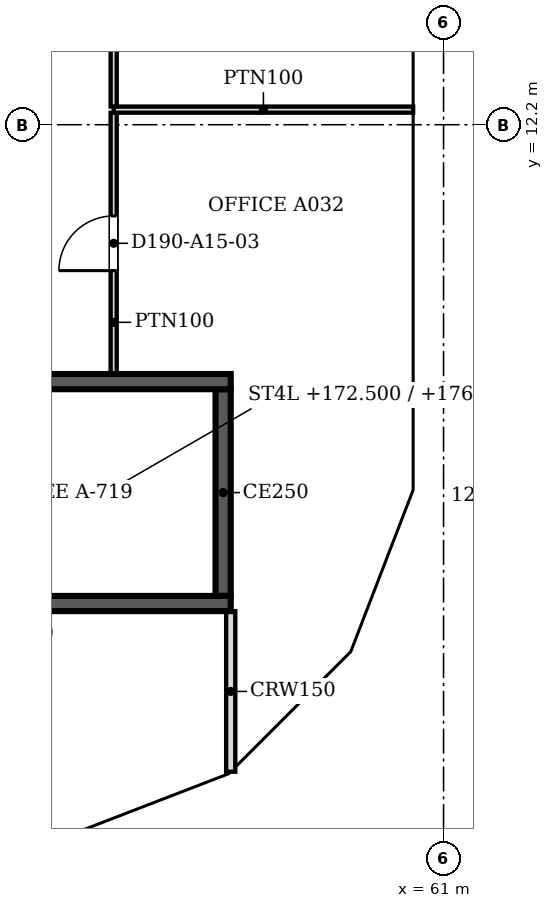
"""IFC4 building model, lengths in metres.
Left out: names, types, materials, properties, quantities, classifications, styles, units other than length and angle.
Written with IfcOpenShell. Run it as: python <this file> out.ifc"""

import sys

from ifc_helpers import new_model, si_unit, direction, frame, frame_2d, origin, place, context, subcontext, project, spatial, polyline, rectangle, outline, extrude, faceted_brep, source, transform, mapped, element, fill, save


model = new_model("IFC4")
c1 = context("Model", 3, precision=1e-05, world=origin(), true_north=direction((0.0, 1.0)))
c2 = subcontext(c1, "Body", "Model", "MODEL_VIEW")
j1 = project(units=[si_unit("LENGTHUNIT", "METRE"), si_unit("PLANEANGLEUNIT", "RADIAN")], contexts=[c1])
p1 = place(None, origin())
s1 = spatial("IfcSite", under=j1, at=p1, CompositionType="ELEMENT")
p2 = place(p1, origin())
s2 = spatial("IfcBuilding", under=s1, at=p2, CompositionType="ELEMENT")
p3 = place(p2, frame((0.0, 0.0, 170.6)))
s3 = spatial("IfcBuildingStorey", under=s2, at=p3, CompositionType="ELEMENT", Elevation=170.6)
m1 = source(origin(), c2, "Body", "Brep", [
    faceted_brep([(0.047, -0.25, 0.0), (2.997, -0.25, 3.8), (0.047, -0.25, 7.6), (0.0, -0.25, 7.541), (0.0, -0.25, 0.059), (0.093, 0.25, 7.54), (2.944, 0.25, 3.868), (2.944, 0.25, 3.732), (0.093, 0.25, 0.06), (2.997, 0.0, 3.8), (0.047, 0.0, 0.0), (0.047, 0.0, 7.6)], [[[0, 1, 2, 3, 4]], [[5, 6, 7, 8]], [[8, 7, 9, 1, 0, 10]], [[6, 5, 11, 2, 1, 9]], [[3, 2, 11]], [[10, 0, 4]], [[8, 10, 4, 3, 11, 5]], [[7, 6, 9]]]),
])
p4 = place(p3, frame((54.81, 0.233, -3.8), z_axis=(0.0, 0.0, 1.0), x_axis=(0.932990326376, 0.359901446078, 0.0)))
e1 = element("IfcWall", 1, at=p4, inside=s3, PredefinedType="SOLIDWALL", context=c2, shape_type="MappedRepresentation", body=[
    mapped(m1, transform((0.0, 0.0, 0.0), scale=1.0)),
])
m2 = source(origin(), c2, "Body", "SweptSolid", [
    extrude(outline(polyline([(0.247, 0.665), (2.681, 3.8), (0.247, 6.935), (0.247, 0.665)])), frame((0.0, 0.26, 0.0), z_axis=(0.0, -1.0, 0.0), x_axis=(1.0, 0.0, 0.0)), (0.0, 0.0, 1.0), 0.52),
])
p5 = place(p4, origin())
e2 = element("IfcOpeningElement", 2, at=p5, cuts=e1, PredefinedType="OPENING", context=c2, shape_type="MappedRepresentation", body=[
    mapped(m2, transform((0.0, 0.0, 0.0), scale=1.0)),
])
m3 = source(origin(), c2, "Body", "Brep", [
    faceted_brep([(2.944, -0.25, 0.0), (2.997, -0.25, 0.068), (2.997, -0.25, 7.532), (2.944, -0.25, 7.6), (0.0, -0.25, 3.8), (0.053, 0.25, 3.868), (2.891, 0.25, 7.532), (2.891, 0.25, 0.068), (0.053, 0.25, 3.732), (2.944, 0.0, 0.0), (2.944, 0.0, 7.6), (0.0, 0.0, 3.8)], [[[0, 1, 2, 3, 4]], [[5, 6, 7, 8]], [[1, 0, 9]], [[10, 3, 2]], [[6, 5, 11, 4, 3, 10]], [[8, 7, 9, 0, 4, 11]], [[8, 11, 5]], [[1, 9, 7, 6, 10, 2]]]),
])
p6 = place(p3, frame((57.606, 1.312, -3.8), z_axis=(0.0, 0.0, 1.0), x_axis=(0.707147509625, 0.707066050402, 0.0)))
e3 = element("IfcWall", 3, at=p6, inside=s3, PredefinedType="SOLIDWALL", context=c2, shape_type="MappedRepresentation", body=[
    mapped(m3, transform((0.0, 0.0, 0.0), scale=1.0)),
])
m4 = source(origin(), c2, "Body", "SweptSolid", [
    extrude(outline(polyline([(2.744, 6.934), (0.316, 3.8), (2.744, 0.666), (2.744, 6.934)])), frame((0.0, 0.26, 0.0), z_axis=(0.0, -1.0, 0.0), x_axis=(1.0, 0.0, 0.0)), (0.0, 0.0, 1.0), 0.52),
])
p7 = place(p6, origin())
e4 = element("IfcOpeningElement", 4, at=p7, cuts=e3, PredefinedType="OPENING", context=c2, shape_type="MappedRepresentation", body=[
    mapped(m4, transform((0.0, 0.0, 0.0), scale=1.0)),
])
m5 = source(origin(), c2, "Body", "Brep", [
    faceted_brep([(0.053, -0.25, 0.0), (3.003, -0.25, 3.8), (0.053, -0.25, 7.6), (0.0, -0.25, 7.531), (0.0, -0.25, 0.068), (0.106, 0.25, 7.532), (2.957, 0.25, 3.86), (2.957, 0.25, 3.74), (0.106, 0.25, 0.068), (3.003, 0.0, 3.8), (0.053, 0.0, 0.0), (0.053, 0.0, 7.6)], [[[0, 1, 2, 3, 4]], [[5, 6, 7, 8]], [[8, 7, 9, 1, 0, 10]], [[6, 5, 11, 2, 1, 9]], [[3, 2, 11]], [[10, 0, 4]], [[8, 10, 4, 3, 11, 5]], [[7, 6, 9]]]),
])
p8 = place(p3, frame((59.669, 3.344, -3.8), z_axis=(0.0, 0.0, 1.0), x_axis=(0.35992665181, 0.932980602862, 0.0)))
e5 = element("IfcWall", 5, at=p8, inside=s3, PredefinedType="SOLIDWALL", context=c2, shape_type="MappedRepresentation", body=[
    mapped(m5, transform((0.0, 0.0, 0.0), scale=1.0)),
])
m6 = source(origin(), c2, "Body", "SweptSolid", [
    extrude(outline(polyline([(0.253, 0.665), (2.687, 3.8), (0.253, 6.935), (0.253, 0.665)])), frame((0.0, 0.26, 0.0), z_axis=(0.0, -1.0, 0.0), x_axis=(1.0, 0.0, 0.0)), (0.0, 0.0, 1.0), 0.52),
])
p9 = place(p8, origin())
e6 = element("IfcOpeningElement", 6, at=p9, cuts=e5, PredefinedType="OPENING", context=c2, shape_type="MappedRepresentation", body=[
    mapped(m6, transform((0.0, 0.0, 0.0), scale=1.0)),
])
m7 = source(origin(), c2, "Body", "Brep", [
    faceted_brep([(3.003, -0.25, 0.0), (6.053, -0.25, 3.8), (3.003, -0.25, 7.6), (0.0, -0.25, 3.8), (0.047, 0.25, 3.859), (3.003, 0.25, 7.6), (6.053, 0.25, 3.8), (3.003, 0.25, 0.0), (0.047, 0.25, 3.741), (0.0, 0.0, 3.8)], [[[0, 1, 2, 3]], [[4, 5, 6, 7, 8]], [[7, 6, 1, 0]], [[6, 5, 2, 1]], [[5, 4, 9, 3, 2]], [[8, 7, 0, 3, 9]], [[8, 9, 4]]]),
])
p10 = place(p3, frame((60.75, 6.146, -3.8), z_axis=(0.0, 0.0, 1.0), x_axis=(0.0, 1.0, 0.0)))
e7 = element("IfcWall", 7, at=p10, inside=s3, PredefinedType="SOLIDWALL", context=c2, shape_type="MappedRepresentation", body=[
    mapped(m7, transform((0.0, 0.0, 0.0), scale=1.0)),
])
m8 = source(origin(), c2, "Body", "SweptSolid", [
    extrude(outline(polyline([(3.005, 0.401), (5.733, 3.8), (3.005, 7.199), (0.319, 3.8), (3.005, 0.401)])), frame((0.0, 0.26, 0.0), z_axis=(0.0, -1.0, 0.0), x_axis=(1.0, 0.0, 0.0)), (0.0, 0.0, 1.0), 0.52),
])
p11 = place(p10, origin())
e8 = element("IfcOpeningElement", 8, at=p11, cuts=e7, PredefinedType="OPENING", context=c2, shape_type="MappedRepresentation", body=[
    mapped(m8, transform((0.0, 0.0, 0.0), scale=1.0)),
])
m9 = source(origin(), c2, "Body", "SweptSolid", [
    extrude(outline(polyline([(3.05, 0.0), (6.1, 3.8), (3.05, 7.6), (0.0, 3.8), (3.05, 0.0)])), frame((0.0, 0.25, 0.0), z_axis=(0.0, -1.0, 0.0), x_axis=(1.0, 0.0, 0.0)), (0.0, 0.0, 1.0), 0.5),
])
p12 = place(p3, frame((60.75, 12.2, -3.8), z_axis=(0.0, 0.0, 1.0), x_axis=(0.0, 1.0, 0.0)))
e9 = element("IfcWall", 9, at=p12, inside=s3, PredefinedType="SOLIDWALL", context=c2, shape_type="MappedRepresentation", body=[
    mapped(m9, transform((0.0, 0.0, 0.0), scale=1.0)),
])
m10 = source(origin(), c2, "Body", "SweptSolid", [
    extrude(outline(polyline([(3.05, 0.399), (5.78, 3.8), (3.05, 7.2), (0.321, 3.8), (3.05, 0.399)])), frame((0.0, 0.26, 0.0), z_axis=(0.0, -1.0, 0.0), x_axis=(1.0, 0.0, 0.0)), (0.0, 0.0, 1.0), 0.52),
])
p13 = place(p12, origin())
e10 = element("IfcOpeningElement", 10, at=p13, cuts=e9, PredefinedType="OPENING", context=c2, shape_type="MappedRepresentation", body=[
    mapped(m10, transform((0.0, 0.0, 0.0), scale=1.0)),
])
p14 = place(p2, frame((0.0, 0.0, 174.4)))
s4 = spatial("IfcBuildingStorey", under=s2, at=p14, CompositionType="ELEMENT", Elevation=174.4)
m11 = source(origin(), c2, "Body", "Brep", [
    faceted_brep([(2.95, -0.25, 0.0), (3.003, -0.25, 0.068), (3.003, -0.25, 7.531), (2.95, -0.25, 7.6), (0.0, -0.25, 3.8), (0.047, 0.25, 3.86), (2.898, 0.25, 7.532), (2.898, 0.25, 0.068), (0.047, 0.25, 3.74), (2.95, 0.0, 0.0), (2.95, 0.0, 7.6), (0.0, 0.0, 3.8)], [[[0, 1, 2, 3, 4]], [[5, 6, 7, 8]], [[1, 0, 9]], [[10, 3, 2]], [[6, 5, 11, 4, 3, 10]], [[8, 7, 9, 0, 4, 11]], [[8, 11, 5]], [[1, 9, 7, 6, 10, 2]]]),
])
p15 = place(p14, frame((54.854, 0.25, -3.8), z_axis=(0.0, 0.0, 1.0), x_axis=(0.932970071518, 0.359953949349, 0.0)))
e11 = element("IfcWall", 11, at=p15, inside=s4, PredefinedType="SOLIDWALL", context=c2, shape_type="MappedRepresentation", body=[
    mapped(m11, transform((0.0, 0.0, 0.0), scale=1.0)),
])
m12 = source(origin(), c2, "Body", "SweptSolid", [
    extrude(outline(polyline([(2.75, 6.935), (0.316, 3.8), (2.75, 0.665), (2.75, 6.935)])), frame((0.0, 0.26, 0.0), z_axis=(0.0, -1.0, 0.0), x_axis=(1.0, 0.0, 0.0)), (0.0, 0.0, 1.0), 0.52),
])
p16 = place(p15, origin())
e12 = element("IfcOpeningElement", 12, at=p16, cuts=e11, PredefinedType="OPENING", context=c2, shape_type="MappedRepresentation", body=[
    mapped(m12, transform((0.0, 0.0, 0.0), scale=1.0)),
])
m13 = source(origin(), c2, "Body", "Brep", [
    faceted_brep([(0.053, -0.25, 0.0), (2.997, -0.25, 3.8), (0.053, -0.25, 7.6), (0.0, -0.25, 7.532), (0.0, -0.25, 0.068), (0.106, 0.25, 7.531), (2.944, 0.25, 3.868), (2.944, 0.25, 3.732), (0.106, 0.25, 0.068), (2.997, 0.0, 3.8), (0.053, 0.0, 0.0), (0.053, 0.0, 7.6)], [[[0, 1, 2, 3, 4]], [[5, 6, 7, 8]], [[8, 7, 9, 1, 0, 10]], [[6, 5, 11, 2, 1, 9]], [[3, 2, 11]], [[10, 0, 4]], [[8, 10, 4, 3, 11, 5]], [[9, 7, 6]]]),
])
p17 = place(p14, frame((57.569, 1.274, -3.8), z_axis=(0.0, 0.0, 1.0), x_axis=(0.707066050402, 0.707147509625, 0.0)))
e13 = element("IfcWall", 13, at=p17, inside=s4, PredefinedType="SOLIDWALL", context=c2, shape_type="MappedRepresentation", body=[
    mapped(m13, transform((0.0, 0.0, 0.0), scale=1.0)),
])
m14 = source(origin(), c2, "Body", "SweptSolid", [
    extrude(outline(polyline([(0.253, 0.666), (2.681, 3.8), (0.253, 6.934), (0.253, 0.666)])), frame((0.0, 0.26, 0.0), z_axis=(0.0, -1.0, 0.0), x_axis=(1.0, 0.0, 0.0)), (0.0, 0.0, 1.0), 0.52),
])
p18 = place(p17, origin())
e14 = element("IfcOpeningElement", 14, at=p18, cuts=e13, PredefinedType="OPENING", context=c2, shape_type="MappedRepresentation", body=[
    mapped(m14, transform((0.0, 0.0, 0.0), scale=1.0)),
])
m15 = source(origin(), c2, "Body", "Brep", [
    faceted_brep([(2.95, -0.25, 0.0), (2.997, -0.25, 0.059), (2.997, -0.25, 7.541), (2.95, -0.25, 7.6), (0.0, -0.25, 3.8), (0.053, 0.25, 3.868), (2.904, 0.25, 7.54), (2.904, 0.25, 0.06), (0.053, 0.25, 3.732), (2.95, 0.0, 0.0), (2.95, 0.0, 7.6), (0.0, 0.0, 3.8)], [[[0, 1, 2, 3, 4]], [[5, 6, 7, 8]], [[1, 0, 9]], [[10, 3, 2]], [[6, 5, 11, 4, 3, 10]], [[8, 7, 9, 0, 4, 11]], [[8, 11, 5]], [[1, 9, 7, 6, 10, 2]]]),
])
p19 = place(p14, frame((59.688, 3.394, -3.8), z_axis=(0.0, 0.0, 1.0), x_axis=(0.359972353723, 0.932962970624, 0.0)))
e15 = element("IfcWall", 15, at=p19, inside=s4, PredefinedType="SOLIDWALL", context=c2, shape_type="MappedRepresentation", body=[
    mapped(m15, transform((0.0, 0.0, 0.0), scale=1.0)),
])
p20 = place(p19, origin())
e16 = element("IfcOpeningElement", 16, at=p20, cuts=e15, PredefinedType="OPENING", context=c2, shape_type="MappedRepresentation", body=[
    mapped(m12, transform((0.0, 0.0, 0.0), scale=1.0)),
])
m16 = source(origin(), c2, "Body", "Brep", [
    faceted_brep([(0.047, -0.25, 0.0), (3.05, -0.25, 3.8), (0.047, -0.25, 7.6), (0.0, -0.25, 7.54), (0.0, -0.25, 0.06), (0.093, 0.25, 7.541), (3.05, 0.25, 3.8), (0.093, 0.25, 0.059), (0.047, 0.0, 0.0), (0.047, 0.0, 7.6)], [[[0, 1, 2, 3, 4]], [[5, 6, 7]], [[7, 6, 1, 0, 8]], [[6, 5, 9, 2, 1]], [[3, 2, 9]], [[8, 0, 4]], [[7, 8, 4, 3, 9, 5]]]),
])
p21 = place(p14, frame((60.75, 6.1, -3.8), z_axis=(0.0, 0.0, 1.0), x_axis=(0.0, 1.0, 0.0)))
e17 = element("IfcWall", 17, at=p21, inside=s4, PredefinedType="SOLIDWALL", context=c2, shape_type="MappedRepresentation", body=[
    mapped(m16, transform((0.0, 0.0, 0.0), scale=1.0)),
])
m17 = source(origin(), c2, "Body", "SweptSolid", [
    extrude(outline(polyline([(0.247, 0.656), (2.731, 3.8), (0.247, 6.944), (0.247, 0.656)])), frame((0.0, 0.26, 0.0), z_axis=(0.0, -1.0, 0.0), x_axis=(1.0, 0.0, 0.0)), (0.0, 0.0, 1.0), 0.52),
])
p22 = place(p21, origin())
e18 = element("IfcOpeningElement", 18, at=p22, cuts=e17, PredefinedType="OPENING", context=c2, shape_type="MappedRepresentation", body=[
    mapped(m17, transform((0.0, 0.0, 0.0), scale=1.0)),
])
m18 = source(origin(), c2, "Body", "SweptSolid", [
    extrude(outline(polyline([(3.05, 0.0), (6.1, 3.8), (3.05, 7.6), (0.0, 3.8), (3.05, 0.0)])), frame((0.0, 0.25, 0.0), z_axis=(0.0, -1.0, 0.0), x_axis=(1.0, 0.0, 0.0)), (0.0, 0.0, 1.0), 0.5),
])
p23 = place(p14, frame((60.75, 9.15, -3.8), z_axis=(0.0, 0.0, 1.0), x_axis=(0.0, 1.0, 0.0)))
e19 = element("IfcWall", 19, at=p23, inside=s4, PredefinedType="SOLIDWALL", context=c2, shape_type="MappedRepresentation", body=[
    mapped(m18, transform((0.0, 0.0, 0.0), scale=1.0)),
])
m19 = source(origin(), c2, "Body", "SweptSolid", [
    extrude(outline(polyline([(3.05, 0.399), (5.78, 3.8), (3.05, 7.2), (0.321, 3.8), (3.05, 0.399)])), frame((0.0, 0.26, 0.0), z_axis=(0.0, -1.0, 0.0), x_axis=(1.0, 0.0, 0.0)), (0.0, 0.0, 1.0), 0.52),
])
p24 = place(p23, origin())
e20 = element("IfcOpeningElement", 20, at=p24, cuts=e19, PredefinedType="OPENING", context=c2, shape_type="MappedRepresentation", body=[
    mapped(m19, transform((0.0, 0.0, 0.0), scale=1.0)),
])
p25 = place(p3, frame((57.5, 4.325, 0.0), z_axis=(0.0, 0.0, 1.0), x_axis=(-1.0, 0.0, 0.0)))
e21 = element("IfcWall", 21, at=p25, inside=s3, PredefinedType="SOLIDWALL", context=c2, shape_type="SweptSolid", body=[
    extrude(rectangle(XDim=8.5, YDim=0.25, at=frame_2d((4.25, 0.0))), origin(), (0.0, 0.0, 1.0), 3.8),
])
m20 = source(origin(), c2, "Body", "SweptSolid", [
    extrude(rectangle(XDim=1.2, YDim=2.1, at=frame_2d((0.6, 1.05))), frame((0.0, 0.135, 0.0), z_axis=(0.0, -1.0, 0.0), x_axis=(1.0, 0.0, 0.0)), (0.0, 0.0, 1.0), 0.27),
])
p26 = place(p25, frame((6.9, 0.0, 0.0)))
e22 = element("IfcOpeningElement", 22, at=p26, cuts=e21, PredefinedType="OPENING", context=c2, shape_type="MappedRepresentation", body=[
    mapped(m20, transform((0.0, 0.0, 0.0), scale=1.0)),
])
p27 = place(p3, frame((49.0, 7.975, 0.0), z_axis=(0.0, 0.0, 1.0), x_axis=(1.0, 0.0, 0.0)))
e23 = element("IfcWall", 23, at=p27, inside=s3, PredefinedType="SOLIDWALL", context=c2, shape_type="SweptSolid", body=[
    extrude(rectangle(XDim=8.5, YDim=0.25, at=frame_2d((4.25, 0.0))), origin(), (0.0, 0.0, 1.0), 3.8),
])
p28 = place(p3, frame((57.375, 7.85, 0.0), z_axis=(0.0, 0.0, 1.0), x_axis=(0.0, -1.0, 0.0)))
e24 = element("IfcWall", 24, at=p28, inside=s3, PredefinedType="SOLIDWALL", context=c2, shape_type="SweptSolid", body=[
    extrude(rectangle(XDim=3.4, YDim=0.25, at=frame_2d((1.7, 0.0))), origin(), (0.0, 0.0, 1.0), 3.8),
])
p29 = place(p3, frame((57.5, 1.559, 0.0), z_axis=(0.0, 0.0, 1.0), x_axis=(0.0, 1.0, 0.0)))
e25 = element("IfcWall", 25, at=p29, inside=s3, PredefinedType="PARTITIONING", context=c2, shape_type="SweptSolid", body=[
    extrude(rectangle(XDim=2.641, YDim=0.15, at=frame_2d((1.32, 0.0))), origin(), (0.0, 0.0, 1.0), 3.067),
])
p30 = place(p3, frame((55.575, 12.397, 0.0), z_axis=(0.0, 0.0, 1.0), x_axis=(0.0, -1.0, 0.0)))
e26 = element("IfcWall", 26, at=p30, inside=s3, PredefinedType="PARTITIONING", context=c2, shape_type="SweptSolid", body=[
    extrude(rectangle(XDim=4.297, YDim=0.1, at=frame_2d((2.148, 0.0))), origin(), (0.0, 0.0, 1.0), 3.067),
])
m21 = source(origin(), c2, "Body", "SweptSolid", [
    extrude(rectangle(XDim=0.9, YDim=2.1, at=frame_2d((0.45, 1.05))), frame((0.0, 0.06, 0.0), z_axis=(0.0, -1.0, 0.0), x_axis=(1.0, 0.0, 0.0)), (0.0, 0.0, 1.0), 0.12),
])
p31 = place(p30, frame((1.697, 0.0, 0.0)))
e27 = element("IfcOpeningElement", 27, at=p31, cuts=e26, PredefinedType="OPENING", context=c2, shape_type="MappedRepresentation", body=[
    mapped(m21, transform((0.0, 0.0, 0.0), scale=1.0)),
])
p32 = place(p3, frame((55.575, 12.448, 0.0), z_axis=(0.0, 0.0, 1.0), x_axis=(1.0, 0.0, 0.0)))
e28 = element("IfcWall", 28, at=p32, inside=s3, PredefinedType="PARTITIONING", context=c2, shape_type="SweptSolid", body=[
    extrude(rectangle(XDim=4.925, YDim=0.1, at=frame_2d((2.462, 0.0))), origin(), (0.0, 0.0, 1.0), 3.067),
])
p33 = place(p3, frame((55.575, 17.024, 0.0), z_axis=(0.0, 0.0, 1.0), x_axis=(0.0, -1.0, 0.0)))
e29 = element("IfcWall", 29, at=p33, inside=s3, PredefinedType="PARTITIONING", context=c2, shape_type="SweptSolid", body=[
    extrude(rectangle(XDim=4.525, YDim=0.1, at=frame_2d((2.263, 0.0))), origin(), (0.0, 0.0, 1.0), 3.067),
])
p34 = place(p33, frame((1.825, 0.0, 0.0)))
e30 = element("IfcOpeningElement", 30, at=p34, cuts=e29, PredefinedType="OPENING", context=c2, shape_type="MappedRepresentation", body=[
    mapped(m21, transform((0.0, 0.0, 0.0), scale=1.0)),
])
m22 = source(origin(), c2, "Body", "SweptSolid", [
    extrude(rectangle(XDim=0.9, YDim=2.1, at=frame_2d((0.45, 1.05))), frame((0.0, 0.025, 0.0), z_axis=(0.0, -1.0, 0.0), x_axis=(1.0, 0.0, 0.0)), (0.0, 0.0, 1.0), 0.05),
])
p35 = place(p31, origin())
e31 = element("IfcDoor", 31, at=p35, inside=s3, OperationType="SINGLE_SWING_RIGHT", PredefinedType="DOOR", context=c2, shape_type="MappedRepresentation", body=[
    mapped(m22, transform((0.0, 0.0, 0.0), scale=1.0)),
])
fill(e27, e31)
save(model, sys.argv[1])
